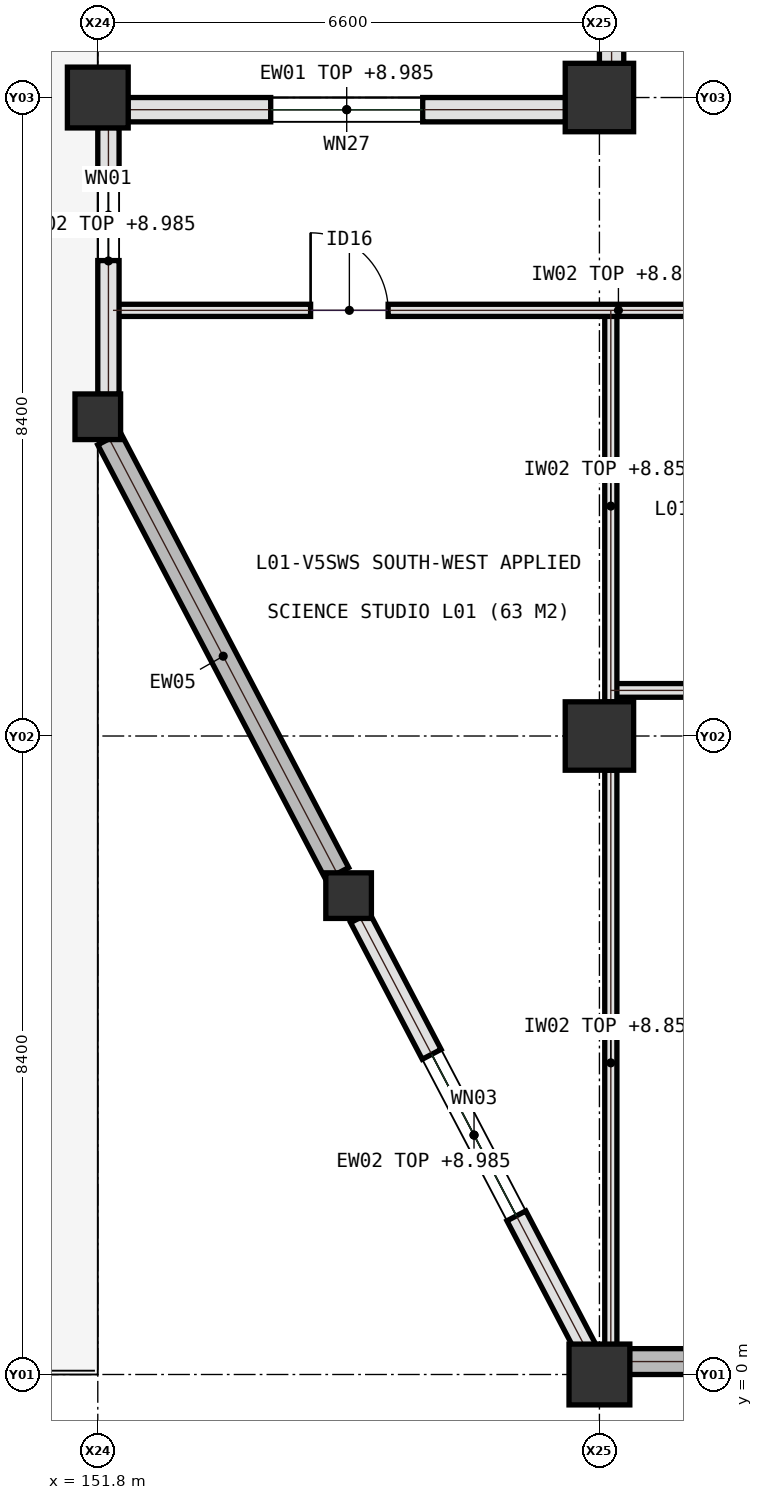
"""IFC4 building model, lengths in metres.
Left out: names, types, materials, properties, quantities, classifications, styles, units other than length and angle.
Written with IfcOpenShell. Run it as: python <this file> out.ifc"""

import sys

from ifc_helpers import new_model, si_unit, direction, frame, frame_2d, origin, origin_2d, place, context, subcontext, project, spatial, rectangle, extrude, element, fill, save


model = new_model("IFC4")
c1 = context("Model", 3, precision=1e-05, world=origin(), true_north=direction((0.0, 1.0)))
c2 = subcontext(c1, "Body", "Model", "MODEL_VIEW")
j1 = project(units=[si_unit("LENGTHUNIT", "METRE"), si_unit("PLANEANGLEUNIT", "RADIAN")], contexts=[c1])
p1 = place(None, origin())
s1 = spatial("IfcSite", under=j1, at=p1, CompositionType="ELEMENT")
p2 = place(p1, origin())
s2 = spatial("IfcBuilding", under=s1, at=p2, CompositionType="ELEMENT")
p3 = place(p2, frame((0.0, 0.0, 5.4)))
s3 = spatial("IfcBuildingStorey", under=s2, at=p3, CompositionType="ELEMENT", Elevation=5.4)
for number, where, z_axis, x_axis in (
    (1, (151.8, 16.8, 0.0), (0.0, 0.0, 1.0), (1.0, 0.0, 0.0)),
    (2, (158.4, 0.0, 0.0), (0.0, 0.0, 1.0), (1.0, 0.0, 0.0)),
):
    element("IfcColumn", number, at=place(p3, frame(where, z_axis=z_axis, x_axis=x_axis)), inside=s3, PredefinedType="COLUMN", context=c2, shape_type="SweptSolid", body=[
        extrude(rectangle(XDim=0.8, YDim=0.8, at=origin_2d()), origin(), (0.0, 0.0, 1.0), 4.5),
    ])
for number, where, z_axis, x_axis in (
    (3, (158.4, 8.4, 0.0), (0.0, 0.0, 1.0), (1.0, 0.0, 0.0)),
    (4, (158.4, 16.8, 0.0), (0.0, 0.0, 1.0), (1.0, 0.0, 0.0)),
):
    element("IfcColumn", number, at=place(p3, frame(where, z_axis=z_axis, x_axis=x_axis)), inside=s3, PredefinedType="COLUMN", context=c2, shape_type="SweptSolid", body=[
        extrude(rectangle(XDim=0.9, YDim=0.9, at=origin_2d()), origin(), (0.0, 0.0, 1.0), 4.5),
    ])
for number, where, z_axis, x_axis in (
    (5, (151.8, 12.6, 0.0), (0.0, 0.0, 1.0), (1.0, 0.0, 0.0)),
    (6, (155.1, 6.3, 0.0), (0.0, 0.0, 1.0), (1.0, 0.0, 0.0)),
):
    element("IfcColumn", number, at=place(p3, frame(where, z_axis=z_axis, x_axis=x_axis)), inside=s3, PredefinedType="COLUMN", context=c2, shape_type="SweptSolid", body=[
        extrude(rectangle(XDim=0.6, YDim=0.6, at=origin_2d()), origin(), (0.0, 0.0, 1.0), 4.5),
    ])
p4 = place(p3, frame((158.55, 9.0, 0.0), z_axis=(0.0, 0.0, 1.0), x_axis=(1.0, 0.0, 0.0)))
e7 = element("IfcWall", 7, at=p4, inside=s3, PredefinedType="SOLIDWALL", context=c2, shape_type="SweptSolid", body=[
    extrude(rectangle(XDim=6.75, YDim=0.18, at=frame_2d((3.375, 0.0))), origin(), (0.0, 0.0, 1.0), 3.45),
])
p5 = place(p4, frame((2.5, 0.0, 0.0)))
e8 = element("IfcOpeningElement", 8, at=p5, cuts=e7, PredefinedType="OPENING", context=c2, shape_type="SweptSolid", body=[
    extrude(rectangle(XDim=1.6, YDim=2.2, at=frame_2d((0.8, 1.1))), frame((0.0, 0.1, 0.0), z_axis=(0.0, -1.0, 0.0), x_axis=(1.0, 0.0, 0.0)), (0.0, 0.0, 1.0), 0.2),
])
p6 = place(p3, frame((158.55, 0.25, 0.0), z_axis=(0.0, 0.0, 1.0), x_axis=(0.0, 1.0, 0.0)))
e9 = element("IfcWall", 9, at=p6, inside=s3, PredefinedType="PARTITIONING", context=c2, shape_type="SweptSolid", body=[
    extrude(rectangle(XDim=7.7, YDim=0.16, at=frame_2d((3.85, 0.0))), origin(), (0.0, 0.0, 1.0), 3.45),
])
p7 = place(p3, frame((158.55, 8.85, 0.0), z_axis=(0.0, 0.0, 1.0), x_axis=(0.0, 1.0, 0.0)))
e10 = element("IfcWall", 10, at=p7, inside=s3, PredefinedType="PARTITIONING", context=c2, shape_type="SweptSolid", body=[
    extrude(rectangle(XDim=5.15, YDim=0.16, at=frame_2d((2.575, 0.0))), origin(), (0.0, 0.0, 1.0), 3.45),
])
p8 = place(p3, frame((152.0, 14.0, 0.0), z_axis=(0.0, 0.0, 1.0), x_axis=(1.0, 0.0, 0.0)))
e11 = element("IfcWall", 11, at=p8, inside=s3, PredefinedType="PARTITIONING", context=c2, shape_type="SweptSolid", body=[
    extrude(rectangle(XDim=13.3, YDim=0.16, at=frame_2d((6.65, 0.0))), origin(), (0.0, 0.0, 1.0), 3.45),
])
p9 = place(p8, frame((2.6, 0.0, 0.0)))
e12 = element("IfcOpeningElement", 12, at=p9, cuts=e11, PredefinedType="OPENING", context=c2, shape_type="SweptSolid", body=[
    extrude(rectangle(XDim=1.02, YDim=2.18, at=frame_2d((0.51, 1.09))), frame((0.0, 0.09, 0.0), z_axis=(0.0, -1.0, 0.0), x_axis=(1.0, 0.0, 0.0)), (0.0, 0.0, 1.0), 0.18),
])
p10 = place(p8, frame((9.8, 0.0, 0.0)))
e13 = element("IfcOpeningElement", 13, at=p10, cuts=e11, PredefinedType="OPENING", context=c2, shape_type="SweptSolid", body=[
    extrude(rectangle(XDim=1.02, YDim=2.18, at=frame_2d((0.51, 1.09))), frame((0.0, 0.09, 0.0), z_axis=(0.0, -1.0, 0.0), x_axis=(1.0, 0.0, 0.0)), (0.0, 0.0, 1.0), 0.18),
])
p11 = place(p3, frame((157.955, 16.64, 0.0), z_axis=(0.0, 0.0, 1.0), x_axis=(-1.0, 0.0, 0.0)))
e14 = element("IfcWall", 14, at=p11, inside=s3, PredefinedType="SOLIDWALL", context=c2, shape_type="SweptSolid", body=[
    extrude(rectangle(XDim=5.76, YDim=0.32, at=frame_2d((2.88, 0.0))), origin(), (0.0, 0.0, 1.0), 3.585),
])
p12 = place(p11, frame((1.88, 0.0, 0.95)))
e15 = element("IfcOpeningElement", 15, at=p12, cuts=e14, PredefinedType="OPENING", context=c2, shape_type="SweptSolid", body=[
    extrude(rectangle(XDim=2.0, YDim=1.95, at=frame_2d((1.0, 0.975))), frame((0.0, 0.17, 0.0), z_axis=(0.0, -1.0, 0.0), x_axis=(1.0, 0.0, 0.0)), (0.0, 0.0, 1.0), 0.34),
])
p13 = place(p3, frame((158.795, 0.17, 0.0), z_axis=(0.0, 0.0, 1.0), x_axis=(1.0, 0.0, 0.0)))
e16 = element("IfcWall", 16, at=p13, inside=s3, PredefinedType="SHEAR", context=c2, shape_type="SweptSolid", body=[
    extrude(rectangle(XDim=5.81, YDim=0.34, at=frame_2d((2.905, 0.0))), origin(), (0.0, 0.0, 1.0), 4.2),
])
p14 = place(p3, frame((158.56, 24.755, 0.0), z_axis=(0.0, 0.0, 1.0), x_axis=(0.0, -1.0, 0.0)))
e17 = element("IfcWall", 17, at=p14, inside=s3, PredefinedType="SOLIDWALL", context=c2, shape_type="SweptSolid", body=[
    extrude(rectangle(XDim=7.51, YDim=0.32, at=frame_2d((3.755, 0.0))), origin(), (0.0, 0.0, 1.0), 3.485),
])
p15 = place(p14, frame((2.805, 0.0, 0.95)))
e18 = element("IfcOpeningElement", 18, at=p15, cuts=e17, PredefinedType="OPENING", context=c2, shape_type="SweptSolid", body=[
    extrude(rectangle(XDim=1.9, YDim=1.85, at=frame_2d((0.95, 0.925))), frame((0.0, 0.17, 0.0), z_axis=(0.0, -1.0, 0.0), x_axis=(1.0, 0.0, 0.0)), (0.0, 0.0, 1.0), 0.34),
])
p16 = place(p3, frame((151.94, 16.405, 0.0), z_axis=(0.0, 0.0, 1.0), x_axis=(0.0, -1.0, 0.0)))
e19 = element("IfcWall", 19, at=p16, inside=s3, PredefinedType="SOLIDWALL", context=c2, shape_type="SweptSolid", body=[
    extrude(rectangle(XDim=3.51, YDim=0.28, at=frame_2d((1.755, 0.0))), origin(), (0.0, 0.0, 1.0), 3.585),
])
p17 = place(p16, frame((0.55, 0.0, 0.95)))
e20 = element("IfcOpeningElement", 20, at=p17, cuts=e19, PredefinedType="OPENING", context=c2, shape_type="SweptSolid", body=[
    extrude(rectangle(XDim=1.2, YDim=1.5, at=frame_2d((0.6, 0.75))), frame((0.0, 0.15, 0.0), z_axis=(0.0, -1.0, 0.0), x_axis=(1.0, 0.0, 0.0)), (0.0, 0.0, 1.0), 0.3),
])
p18 = place(p3, frame((151.95, 12.31, 0.0), z_axis=(0.0, 0.0, 1.0), x_axis=(0.464471613901, -0.885588007981, 0.0)))
e21 = element("IfcWall", 21, at=p18, inside=s3, PredefinedType="SHEAR", context=c2, shape_type="SweptSolid", body=[
    extrude(rectangle(XDim=6.459, YDim=0.34, at=frame_2d((3.229, 0.0))), origin(), (0.0, 0.0, 1.0), 4.2),
])
p19 = place(p3, frame((155.25, 6.01, 0.0), z_axis=(0.0, 0.0, 1.0), x_axis=(0.464471613901, -0.885588007981, 0.0)))
e22 = element("IfcWall", 22, at=p19, inside=s3, PredefinedType="SOLIDWALL", context=c2, shape_type="SweptSolid", body=[
    extrude(rectangle(XDim=6.459, YDim=0.28, at=frame_2d((3.229, 0.0))), origin(), (0.0, 0.0, 1.0), 3.585),
])
p20 = place(p19, frame((2.03, 0.0, 0.95)))
e23 = element("IfcOpeningElement", 23, at=p20, cuts=e22, PredefinedType="OPENING", context=c2, shape_type="SweptSolid", body=[
    extrude(rectangle(XDim=2.4, YDim=1.6, at=frame_2d((1.2, 0.8))), frame((0.0, 0.15, 0.0), z_axis=(0.0, -1.0, 0.0), x_axis=(1.0, 0.0, 0.0)), (0.0, 0.0, 1.0), 0.3),
])
p21 = place(p9, origin())
e24 = element("IfcDoor", 24, at=p21, inside=s3, OperationType="SINGLE_SWING_LEFT", PredefinedType="DOOR", context=c2, shape_type="SweptSolid", body=[
    extrude(rectangle(XDim=1.02, YDim=2.18, at=frame_2d((0.51, 1.09))), frame((0.0, 0.025, 0.0), z_axis=(0.0, -1.0, 0.0), x_axis=(1.0, 0.0, 0.0)), (0.0, 0.0, 1.0), 0.05),
])
fill(e12, e24)
p22 = place(p12, origin())
e25 = element("IfcWindow", 25, at=p22, inside=s3, PartitioningType="SINGLE_PANEL", PredefinedType="WINDOW", context=c2, shape_type="SweptSolid", body=[
    extrude(rectangle(XDim=2.0, YDim=1.95, at=frame_2d((1.0, 0.975))), frame((0.0, 0.03, 0.0), z_axis=(0.0, -1.0, 0.0), x_axis=(1.0, 0.0, 0.0)), (0.0, 0.0, 1.0), 0.06),
])
fill(e15, e25)
p23 = place(p17, origin())
e26 = element("IfcWindow", 26, at=p23, inside=s3, PartitioningType="SINGLE_PANEL", PredefinedType="WINDOW", context=c2, shape_type="SweptSolid", body=[
    extrude(rectangle(XDim=1.2, YDim=1.5, at=frame_2d((0.6, 0.75))), frame((0.0, 0.03, 0.0), z_axis=(0.0, -1.0, 0.0), x_axis=(1.0, 0.0, 0.0)), (0.0, 0.0, 1.0), 0.06),
])
fill(e20, e26)
p24 = place(p20, origin())
e27 = element("IfcWindow", 27, at=p24, inside=s3, PartitioningType="SINGLE_PANEL", PredefinedType="WINDOW", context=c2, shape_type="SweptSolid", body=[
    extrude(rectangle(XDim=2.4, YDim=1.6, at=frame_2d((1.2, 0.8))), frame((0.0, 0.03, 0.0), z_axis=(0.0, -1.0, 0.0), x_axis=(1.0, 0.0, 0.0)), (0.0, 0.0, 1.0), 0.06),
])
fill(e23, e27)
save(model, sys.argv[1])
